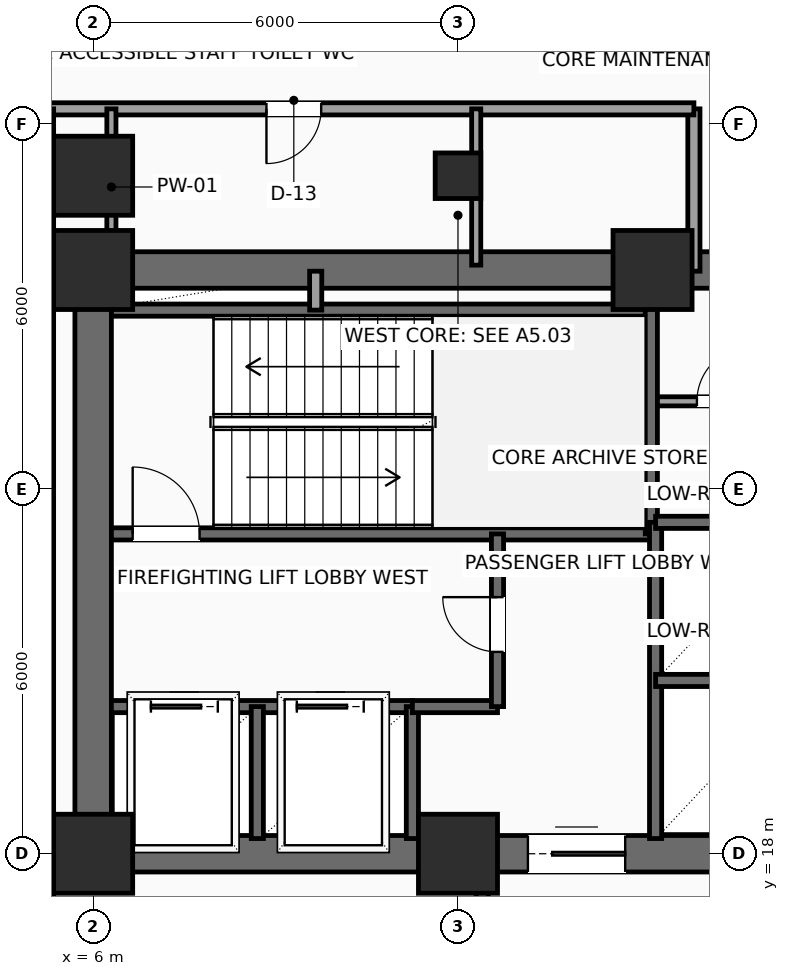
"""IFC4 building model, lengths in metres.
Left out: names, types, materials, properties, quantities, classifications, styles, units other than length and angle.
Written with IfcOpenShell. Run it as: python <this file> out.ifc"""

import sys

from ifc_helpers import new_model, si_unit, direction, frame, frame_2d, origin, origin_2d, place, context, subcontext, project, spatial, rectangle, hollow_rectangle, extrude, element, fill, save


model = new_model("IFC4")
c1 = context("Model", 3, precision=1e-05, world=origin(), true_north=direction((0.0, 1.0)))
c2 = subcontext(c1, "Body", "Model", "MODEL_VIEW")
j1 = project(units=[si_unit("LENGTHUNIT", "METRE"), si_unit("PLANEANGLEUNIT", "RADIAN")], contexts=[c1])
p1 = place(None, origin())
s1 = spatial("IfcSite", under=j1, at=p1, CompositionType="ELEMENT")
p2 = place(p1, origin())
s2 = spatial("IfcBuilding", under=s1, at=p2, CompositionType="ELEMENT")
p3 = place(p2, frame((0.0, 0.0, 51.9)))
s3 = spatial("IfcBuildingStorey", under=s2, at=p3, CompositionType="ELEMENT", Elevation=51.9)
for number, where, z_axis, x_axis in (
    (1, (6.0, 18.0, 0.0), (0.0, 0.0, 1.0), (1.0, 0.0, 0.0)),
    (2, (12.0, 18.0, 0.0), (0.0, 0.0, 1.0), (1.0, 0.0, 0.0)),
    (3, (6.0, 27.6, 0.0), (0.0, 0.0, 1.0), (1.0, 0.0, 0.0)),
    (4, (15.2, 27.6, 0.0), (0.0, 0.0, 1.0), (1.0, 0.0, 0.0)),
    (5, (6.0, 29.15, 0.0), (0.0, 0.0, 1.0), (1.0, 0.0, 0.0)),
):
    element("IfcColumn", number, at=place(p3, frame(where, z_axis=z_axis, x_axis=x_axis)), inside=s3, PredefinedType="COLUMN", context=c2, shape_type="SweptSolid", body=[
        extrude(rectangle(XDim=1.3, YDim=1.3, at=origin_2d()), origin(), (0.0, 0.0, 1.0), 3.9),
    ])
p4 = place(p3, frame((12.0, 29.15, 0.0), z_axis=(0.0, 0.0, 1.0), x_axis=(1.0, 0.0, 0.0)))
e6 = element("IfcColumn", 6, at=p4, inside=s3, PredefinedType="COLUMN", context=c2, shape_type="SweptSolid", body=[
    extrude(hollow_rectangle(XDim=0.75, YDim=0.75, WallThickness=0.035, InnerFilletRadius=0.035, OuterFilletRadius=0.05, at=origin_2d()), origin(), (0.0, 0.0, 1.0), 3.9),
])
p5 = place(p3, frame((6.0, 18.0, 0.0), z_axis=(0.0, 0.0, 1.0), x_axis=(1.0, 0.0, 0.0)))
e7 = element("IfcWall", 7, at=p5, inside=s3, PredefinedType="SHEAR", context=c2, shape_type="SweptSolid", body=[
    extrude(rectangle(XDim=12.0, YDim=0.6, at=frame_2d((6.0, 0.0))), origin(), (0.0, 0.0, 1.0), 3.65),
])
p6 = place(p5, frame((7.15, 0.0, 0.0)))
e8 = element("IfcOpeningElement", 8, at=p6, cuts=e7, PredefinedType="OPENING", context=c2, shape_type="SweptSolid", body=[
    extrude(rectangle(XDim=1.6, YDim=2.3, at=frame_2d((0.8, 1.15))), frame((0.0, 0.31, 0.0), z_axis=(0.0, -1.0, 0.0), x_axis=(1.0, 0.0, 0.0)), (0.0, 0.0, 1.0), 0.62),
])
p7 = place(p3, frame((6.0, 27.6, 0.0), z_axis=(0.0, 0.0, 1.0), x_axis=(1.0, 0.0, 0.0)))
e9 = element("IfcWall", 9, at=p7, inside=s3, PredefinedType="SHEAR", context=c2, shape_type="SweptSolid", body=[
    extrude(rectangle(XDim=12.0, YDim=0.6, at=frame_2d((6.0, 0.0))), origin(), (0.0, 0.0, 1.0), 3.65),
])
p8 = place(p7, frame((10.2, 0.0, 0.0)))
e10 = element("IfcOpeningElement", 10, at=p8, cuts=e9, PredefinedType="OPENING", context=c2, shape_type="SweptSolid", body=[
    extrude(rectangle(XDim=0.9, YDim=2.15, at=frame_2d((0.45, 1.075))), frame((0.0, 0.31, 0.0), z_axis=(0.0, -1.0, 0.0), x_axis=(1.0, 0.0, 0.0)), (0.0, 0.0, 1.0), 0.62),
])
p9 = place(p3, frame((6.0, 18.0, 0.0), z_axis=(0.0, 0.0, 1.0), x_axis=(0.0, 1.0, 0.0)))
e11 = element("IfcWall", 11, at=p9, inside=s3, PredefinedType="SHEAR", context=c2, shape_type="SweptSolid", body=[
    extrude(rectangle(XDim=9.6, YDim=0.6, at=frame_2d((4.8, 0.0))), origin(), (0.0, 0.0, 1.0), 3.65),
])
p10 = place(p3, frame((6.3, 23.26, 0.0), z_axis=(0.0, 0.0, 1.0), x_axis=(1.0, 0.0, 0.0)))
e12 = element("IfcWall", 12, at=p10, inside=s3, PredefinedType="SHEAR", context=c2, shape_type="SweptSolid", body=[
    extrude(rectangle(XDim=8.88, YDim=0.2, at=frame_2d((4.44, 0.0))), origin(), (0.0, 0.0, 1.0), 3.65),
])
p11 = place(p10, frame((0.35, 0.0, 0.0)))
e13 = element("IfcOpeningElement", 13, at=p11, cuts=e12, PredefinedType="OPENING", context=c2, shape_type="SweptSolid", body=[
    extrude(rectangle(XDim=1.1, YDim=2.2, at=frame_2d((0.55, 1.1))), frame((0.0, 0.11, 0.0), z_axis=(0.0, -1.0, 0.0), x_axis=(1.0, 0.0, 0.0)), (0.0, 0.0, 1.0), 0.22),
])
p12 = place(p3, frame((6.3, 26.94, 0.0), z_axis=(0.0, 0.0, 1.0), x_axis=(1.0, 0.0, 0.0)))
e14 = element("IfcWall", 14, at=p12, inside=s3, PredefinedType="SHEAR", context=c2, shape_type="SweptSolid", body=[
    extrude(rectangle(XDim=8.88, YDim=0.2, at=frame_2d((4.44, 0.0))), origin(), (0.0, 0.0, 1.0), 3.65),
])
p13 = place(p3, frame((15.18, 23.26, 0.0), z_axis=(0.0, 0.0, 1.0), x_axis=(0.0, 1.0, 0.0)))
e15 = element("IfcWall", 15, at=p13, inside=s3, PredefinedType="SHEAR", context=c2, shape_type="SweptSolid", body=[
    extrude(rectangle(XDim=4.04, YDim=0.2, at=frame_2d((2.02, 0.0))), origin(), (0.0, 0.0, 1.0), 3.65),
])
p14 = place(p3, frame((6.3, 20.42, 0.0), z_axis=(0.0, 0.0, 1.0), x_axis=(1.0, 0.0, 0.0)))
e16 = element("IfcWall", 16, at=p14, inside=s3, PredefinedType="SHEAR", context=c2, shape_type="SweptSolid", body=[
    extrude(rectangle(XDim=4.95, YDim=0.2, at=frame_2d((2.475, 0.0))), origin(), (0.0, 0.0, 1.0), 3.65),
])
p15 = place(p14, frame((0.65, 0.0, 0.0)))
e17 = element("IfcOpeningElement", 17, at=p15, cuts=e16, PredefinedType="OPENING", context=c2, shape_type="SweptSolid", body=[
    extrude(rectangle(XDim=1.1, YDim=2.2, at=frame_2d((0.55, 1.1))), frame((0.0, 0.11, 0.0), z_axis=(0.0, -1.0, 0.0), x_axis=(1.0, 0.0, 0.0)), (0.0, 0.0, 1.0), 0.22),
])
p16 = place(p14, frame((3.05, 0.0, 0.0)))
e18 = element("IfcOpeningElement", 18, at=p16, cuts=e16, PredefinedType="OPENING", context=c2, shape_type="SweptSolid", body=[
    extrude(rectangle(XDim=1.1, YDim=2.2, at=frame_2d((0.55, 1.1))), frame((0.0, 0.11, 0.0), z_axis=(0.0, -1.0, 0.0), x_axis=(1.0, 0.0, 0.0)), (0.0, 0.0, 1.0), 0.22),
])
for number, where, z_axis, x_axis in (
    (19, (8.7, 18.25, 0.0), (0.0, 0.0, 1.0), (0.0, 1.0, 0.0)),
    (20, (11.25, 18.25, 0.0), (0.0, 0.0, 1.0), (0.0, 1.0, 0.0)),
):
    element("IfcWall", number, at=place(p3, frame(where, z_axis=z_axis, x_axis=x_axis)), inside=s3, PredefinedType="SHEAR", context=c2, shape_type="SweptSolid", body=[
        extrude(rectangle(XDim=2.17, YDim=0.2, at=frame_2d((1.085, 0.0))), origin(), (0.0, 0.0, 1.0), 3.65),
    ])
p17 = place(p3, frame((11.25, 20.42, 0.0), z_axis=(0.0, 0.0, 1.0), x_axis=(1.0, 0.0, 0.0)))
e21 = element("IfcWall", 21, at=p17, inside=s3, PredefinedType="SHEAR", context=c2, shape_type="SweptSolid", body=[
    extrude(rectangle(XDim=1.4, YDim=0.2, at=frame_2d((0.7, 0.0))), origin(), (0.0, 0.0, 1.0), 3.65),
])
p18 = place(p3, frame((12.65, 20.42, 0.0), z_axis=(0.0, 0.0, 1.0), x_axis=(0.0, 1.0, 0.0)))
e22 = element("IfcWall", 22, at=p18, inside=s3, PredefinedType="SHEAR", context=c2, shape_type="SweptSolid", body=[
    extrude(rectangle(XDim=2.84, YDim=0.2, at=frame_2d((1.42, 0.0))), origin(), (0.0, 0.0, 1.0), 3.65),
])
p19 = place(p18, frame((0.9, 0.0, 0.0)))
e23 = element("IfcOpeningElement", 23, at=p19, cuts=e22, PredefinedType="OPENING", context=c2, shape_type="SweptSolid", body=[
    extrude(rectangle(XDim=0.9, YDim=2.15, at=frame_2d((0.45, 1.075))), frame((0.0, 0.11, 0.0), z_axis=(0.0, -1.0, 0.0), x_axis=(1.0, 0.0, 0.0)), (0.0, 0.0, 1.0), 0.22),
])
p20 = place(p3, frame((9.66, 26.94, 0.0), z_axis=(0.0, 0.0, 1.0), x_axis=(0.0, 1.0, 0.0)))
e24 = element("IfcWall", 24, at=p20, inside=s3, PredefinedType="SOLIDWALL", context=c2, shape_type="SweptSolid", body=[
    extrude(rectangle(XDim=0.64, YDim=0.2, at=frame_2d((0.32, 0.0))), origin(), (0.0, 0.0, 1.0), 3.65),
])
p21 = place(p3, frame((15.25, 18.25, 0.0), z_axis=(0.0, 0.0, 1.0), x_axis=(0.0, 1.0, 0.0)))
e25 = element("IfcWall", 25, at=p21, inside=s3, PredefinedType="SHEAR", context=c2, shape_type="SweptSolid", body=[
    extrude(rectangle(XDim=5.2, YDim=0.2, at=frame_2d((2.6, 0.0))), origin(), (0.0, 0.0, 1.0), 3.65),
])
p22 = place(p3, frame((15.25, 20.85, 0.0), z_axis=(0.0, 0.0, 1.0), x_axis=(1.0, 0.0, 0.0)))
e26 = element("IfcWall", 26, at=p22, inside=s3, PredefinedType="SHEAR", context=c2, shape_type="SweptSolid", body=[
    extrude(rectangle(XDim=2.4, YDim=0.2, at=frame_2d((1.2, 0.0))), origin(), (0.0, 0.0, 1.0), 3.65),
])
p23 = place(p3, frame((15.25, 23.45, 0.0), z_axis=(0.0, 0.0, 1.0), x_axis=(1.0, 0.0, 0.0)))
e27 = element("IfcWall", 27, at=p23, inside=s3, PredefinedType="SHEAR", context=c2, shape_type="SweptSolid", body=[
    extrude(rectangle(XDim=2.45, YDim=0.2, at=frame_2d((1.225, 0.0))), origin(), (0.0, 0.0, 1.0), 3.65),
])
p24 = place(p3, frame((15.28, 25.44, 0.0), z_axis=(0.0, 0.0, 1.0), x_axis=(1.0, 0.0, 0.0)))
e28 = element("IfcWall", 28, at=p24, inside=s3, PredefinedType="PARTITIONING", context=c2, shape_type="SweptSolid", body=[
    extrude(rectangle(XDim=2.42, YDim=0.15, at=frame_2d((1.21, 0.0))), origin(), (0.0, 0.0, 1.0), 3.65),
])
p25 = place(p24, frame((0.65, 0.0, 0.0)))
e29 = element("IfcOpeningElement", 29, at=p25, cuts=e28, PredefinedType="OPENING", context=c2, shape_type="SweptSolid", body=[
    extrude(rectangle(XDim=0.9, YDim=2.15, at=frame_2d((0.45, 1.075))), frame((0.0, 0.085, 0.0), z_axis=(0.0, -1.0, 0.0), x_axis=(1.0, 0.0, 0.0)), (0.0, 0.0, 1.0), 0.17),
])
p26 = place(p3, frame((15.88, 27.58, 0.0), z_axis=(0.0, 0.0, 1.0), x_axis=(0.0, 1.0, 0.0)))
e30 = element("IfcWall", 30, at=p26, inside=s3, PredefinedType="PARTITIONING", context=c2, shape_type="SweptSolid", body=[
    extrude(rectangle(XDim=2.67, YDim=0.2, at=frame_2d((1.335, 0.0))), origin(), (0.0, 0.0, 1.0), 3.65),
])
p27 = place(p3, frame((15.88, 30.25, 0.0), z_axis=(0.0, 0.0, 1.0), x_axis=(-1.0, 0.0, 0.0)))
e31 = element("IfcWall", 31, at=p27, inside=s3, PredefinedType="PARTITIONING", context=c2, shape_type="SweptSolid", body=[
    extrude(rectangle(XDim=10.63, YDim=0.2, at=frame_2d((5.315, 0.0))), origin(), (0.0, 0.0, 1.0), 3.65),
])
p28 = place(p27, frame((6.13, 0.0, 0.0)))
e32 = element("IfcOpeningElement", 32, at=p28, cuts=e31, PredefinedType="OPENING", context=c2, shape_type="SweptSolid", body=[
    extrude(rectangle(XDim=0.9, YDim=2.1, at=frame_2d((0.45, 1.05))), frame((0.0, 0.11, 0.0), z_axis=(0.0, -1.0, 0.0), x_axis=(1.0, 0.0, 0.0)), (0.0, 0.0, 1.0), 0.22),
])
p29 = place(p3, frame((5.25, 30.25, 0.0), z_axis=(0.0, 0.0, 1.0), x_axis=(0.0, -1.0, 0.0)))
e33 = element("IfcWall", 33, at=p29, inside=s3, PredefinedType="PARTITIONING", context=c2, shape_type="SweptSolid", body=[
    extrude(rectangle(XDim=13.35, YDim=0.2, at=frame_2d((6.675, 0.0))), origin(), (0.0, 0.0, 1.0), 3.65),
])
p30 = place(p3, frame((12.4, 16.9, 0.0), z_axis=(0.0, 0.0, 1.0), x_axis=(0.0, 1.0, 0.0)))
e34 = element("IfcWall", 34, at=p30, inside=s3, PredefinedType="PARTITIONING", context=c2, shape_type="SweptSolid", body=[
    extrude(rectangle(XDim=1.05, YDim=0.2, at=frame_2d((0.525, 0.0))), origin(), (0.0, 0.0, 1.0), 3.65),
])
for number, where, z_axis, x_axis in (
    (35, (6.3, 27.68, 0.0), (0.0, 0.0, 1.0), (0.0, 1.0, 0.0)),
    (36, (12.3, 27.68, 0.0), (0.0, 0.0, 1.0), (0.0, 1.0, 0.0)),
):
    element("IfcWall", number, at=place(p3, frame(where, z_axis=z_axis, x_axis=x_axis)), inside=s3, PredefinedType="PARTITIONING", context=c2, shape_type="SweptSolid", body=[
        extrude(rectangle(XDim=2.57, YDim=0.15, at=frame_2d((1.285, 0.0))), origin(), (0.0, 0.0, 1.0), 2.992),
    ])
p31 = place(p6, origin())
e37 = element("IfcDoor", 37, at=p31, inside=s3, OperationType="DOUBLE_DOOR_SLIDING", PredefinedType="DOOR", context=c2, shape_type="SweptSolid", body=[
    extrude(rectangle(XDim=1.6, YDim=2.3, at=frame_2d((0.8, 1.15))), frame((0.0, 0.025, 0.0), z_axis=(0.0, -1.0, 0.0), x_axis=(1.0, 0.0, 0.0)), (0.0, 0.0, 1.0), 0.05),
])
fill(e8, e37)
p32 = place(p11, origin())
e38 = element("IfcDoor", 38, at=p32, inside=s3, OperationType="SINGLE_SWING_LEFT", PredefinedType="DOOR", context=c2, shape_type="SweptSolid", body=[
    extrude(rectangle(XDim=1.1, YDim=2.2, at=frame_2d((0.55, 1.1))), frame((0.0, 0.025, 0.0), z_axis=(0.0, -1.0, 0.0), x_axis=(1.0, 0.0, 0.0)), (0.0, 0.0, 1.0), 0.05),
])
fill(e13, e38)
p33 = place(p15, origin())
e39 = element("IfcDoor", 39, at=p33, inside=s3, OperationType="SLIDING_TO_LEFT", PredefinedType="DOOR", context=c2, shape_type="SweptSolid", body=[
    extrude(rectangle(XDim=1.1, YDim=2.2, at=frame_2d((0.55, 1.1))), frame((0.0, 0.025, 0.0), z_axis=(0.0, -1.0, 0.0), x_axis=(1.0, 0.0, 0.0)), (0.0, 0.0, 1.0), 0.05),
])
fill(e17, e39)
p34 = place(p16, origin())
e40 = element("IfcDoor", 40, at=p34, inside=s3, OperationType="SLIDING_TO_LEFT", PredefinedType="DOOR", context=c2, shape_type="SweptSolid", body=[
    extrude(rectangle(XDim=1.1, YDim=2.2, at=frame_2d((0.55, 1.1))), frame((0.0, 0.025, 0.0), z_axis=(0.0, -1.0, 0.0), x_axis=(1.0, 0.0, 0.0)), (0.0, 0.0, 1.0), 0.05),
])
fill(e18, e40)
p35 = place(p19, origin())
e41 = element("IfcDoor", 41, at=p35, inside=s3, OperationType="SINGLE_SWING_RIGHT", PredefinedType="DOOR", context=c2, shape_type="SweptSolid", body=[
    extrude(rectangle(XDim=0.9, YDim=2.15, at=frame_2d((0.45, 1.075))), frame((0.0, 0.025, 0.0), z_axis=(0.0, -1.0, 0.0), x_axis=(1.0, 0.0, 0.0)), (0.0, 0.0, 1.0), 0.05),
])
fill(e23, e41)
p36 = place(p25, origin())
e42 = element("IfcDoor", 42, at=p36, inside=s3, OperationType="SINGLE_SWING_RIGHT", PredefinedType="DOOR", context=c2, shape_type="SweptSolid", body=[
    extrude(rectangle(XDim=0.9, YDim=2.15, at=frame_2d((0.45, 1.075))), frame((0.0, 0.025, 0.0), z_axis=(0.0, -1.0, 0.0), x_axis=(1.0, 0.0, 0.0)), (0.0, 0.0, 1.0), 0.05),
])
fill(e29, e42)
p37 = place(p28, origin())
e43 = element("IfcDoor", 43, at=p37, inside=s3, OperationType="SINGLE_SWING_RIGHT", PredefinedType="DOOR", context=c2, shape_type="SweptSolid", body=[
    extrude(rectangle(XDim=0.9, YDim=2.1, at=frame_2d((0.45, 1.05))), frame((0.0, 0.025, 0.0), z_axis=(0.0, -1.0, 0.0), x_axis=(1.0, 0.0, 0.0)), (0.0, 0.0, 1.0), 0.05),
])
fill(e32, e43)
save(model, sys.argv[1])
